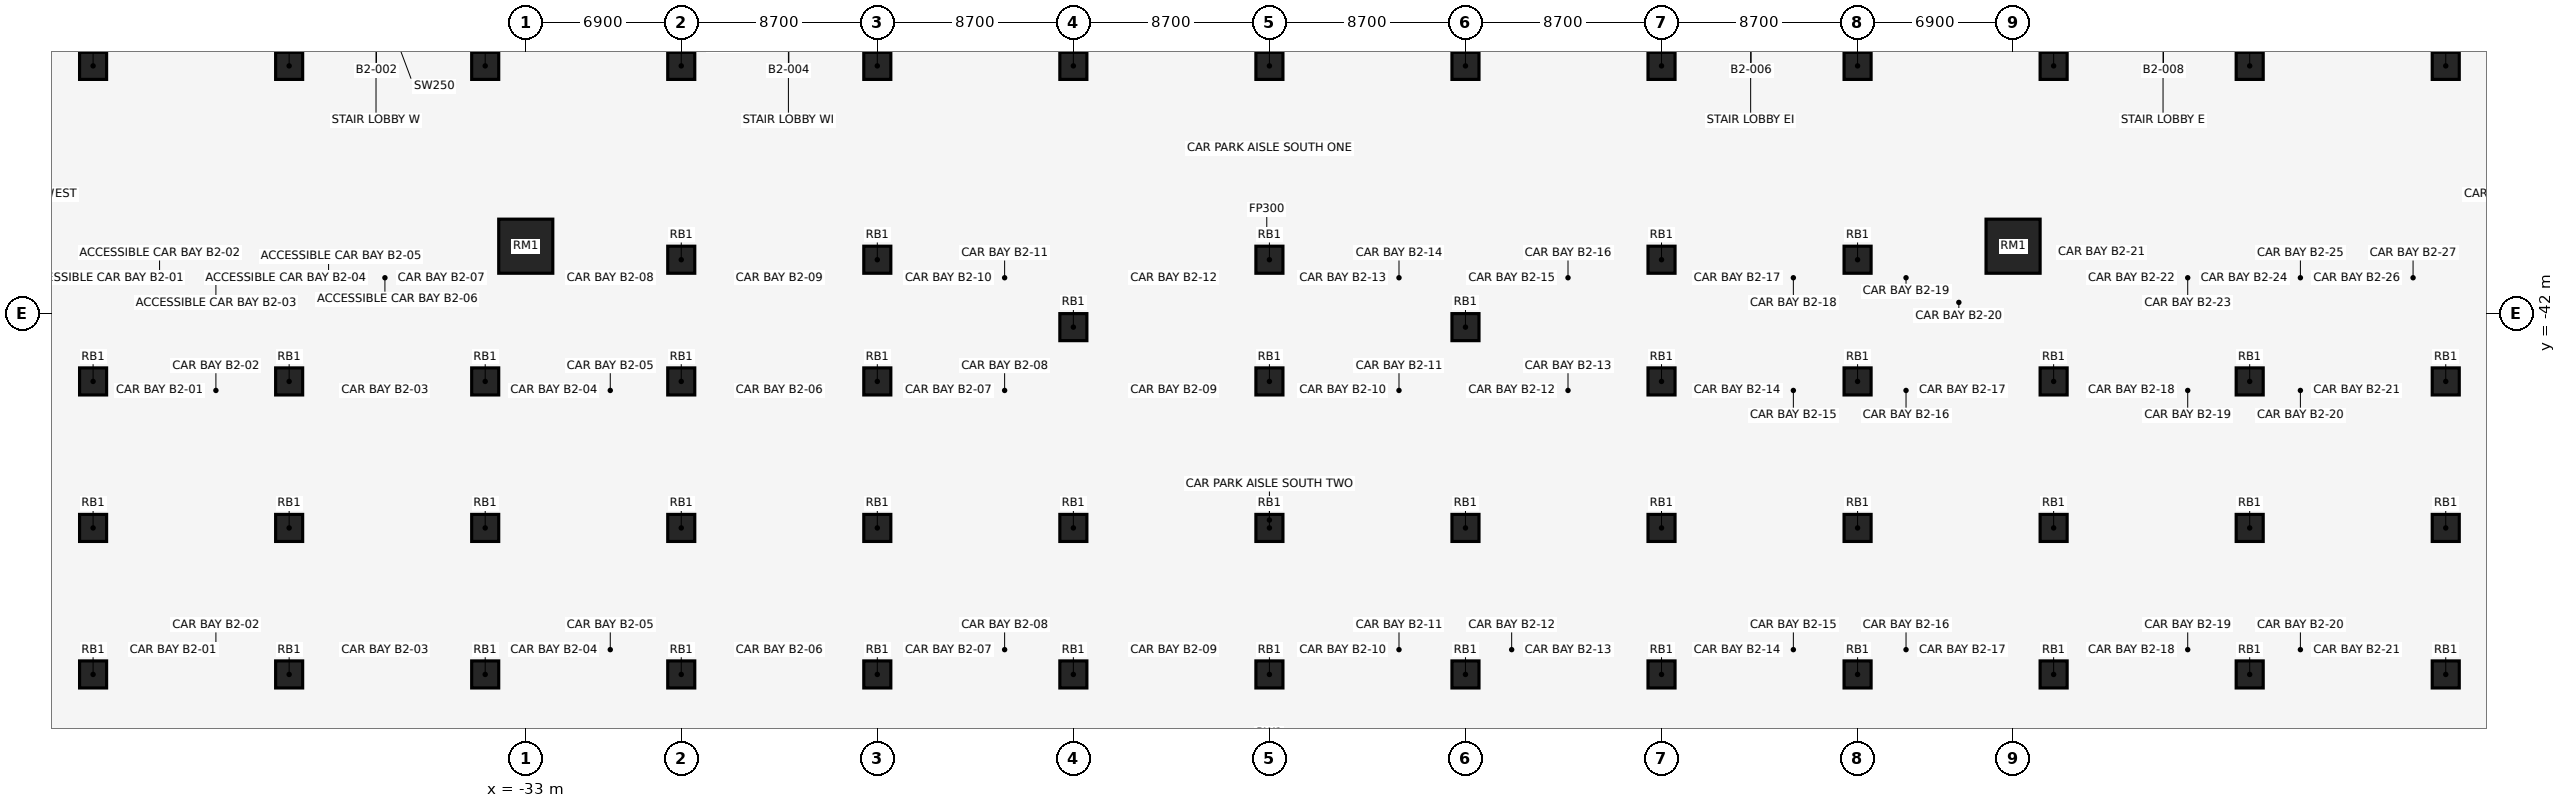
"""IFC4 building model, lengths in metres.
Left out: names, types, materials, properties, quantities, classifications, styles, units other than length and angle.
Written with IfcOpenShell. Run it as: python <this file> out.ifc"""

import sys

from ifc_helpers import new_model, si_unit, direction, frame, origin, origin_2d, place, context, subcontext, project, spatial, rectangle, extrude, element, save


model = new_model("IFC4")
c1 = context("Model", 3, precision=1e-05, world=origin(), true_north=direction((0.0, 1.0)))
c2 = subcontext(c1, "Body", "Model", "MODEL_VIEW")
j1 = project(units=[si_unit("LENGTHUNIT", "METRE"), si_unit("PLANEANGLEUNIT", "RADIAN")], contexts=[c1])
p1 = place(None, origin())
s1 = spatial("IfcSite", under=j1, at=p1, CompositionType="ELEMENT")
p2 = place(p1, origin())
s2 = spatial("IfcBuilding", under=s1, at=p2, CompositionType="ELEMENT")
p3 = place(p2, frame((0.0, 0.0, -10.0)))
s3 = spatial("IfcBuildingStorey", under=s2, at=p3, CompositionType="ELEMENT", Elevation=-10.0)
p4 = place(p3, frame((-33.0, -39.0, 0.0), z_axis=(0.0, 0.0, 1.0), x_axis=(1.0, 0.0, 0.0)))
e1 = element("IfcColumn", 1, at=p4, inside=s3, PredefinedType="COLUMN", context=c2, shape_type="SweptSolid", body=[
    extrude(rectangle(XDim=2.4, YDim=2.4, at=origin_2d()), origin(), (0.0, 0.0, 1.0), 5.0),
])
for number, where, z_axis, x_axis in (
    (2, (-26.1, -39.6, 0.0), (0.0, 0.0, 1.0), (1.0, 0.0, 0.0)),
    (3, (-17.4, -39.6, 0.0), (0.0, 0.0, 1.0), (1.0, 0.0, 0.0)),
    (4, (-8.7, -42.591, 0.0), (0.0, 0.0, 1.0), (1.0, 0.0, 0.0)),
    (5, (0.0, -39.6, 0.0), (0.0, 0.0, 1.0), (1.0, 0.0, 0.0)),
    (6, (8.7, -42.591, 0.0), (0.0, 0.0, 1.0), (1.0, 0.0, 0.0)),
    (7, (17.4, -39.6, 0.0), (0.0, 0.0, 1.0), (1.0, 0.0, 0.0)),
    (8, (26.1, -39.6, 0.0), (0.0, 0.0, 1.0), (1.0, 0.0, 0.0)),
):
    element("IfcColumn", number, at=place(p3, frame(where, z_axis=z_axis, x_axis=x_axis)), inside=s3, PredefinedType="COLUMN", context=c2, shape_type="SweptSolid", body=[
        extrude(rectangle(XDim=1.2, YDim=1.2, at=origin_2d()), origin(), (0.0, 0.0, 1.0), 5.0),
    ])
p5 = place(p3, frame((33.0, -39.0, 0.0), z_axis=(0.0, 0.0, 1.0), x_axis=(1.0, 0.0, 0.0)))
e9 = element("IfcColumn", 9, at=p5, inside=s3, PredefinedType="COLUMN", context=c2, shape_type="SweptSolid", body=[
    extrude(rectangle(XDim=2.4, YDim=2.4, at=origin_2d()), origin(), (0.0, 0.0, 1.0), 5.0),
])
for number, where, z_axis, x_axis in (
    (10, (-52.2, -31.0, 0.0), (0.0, 0.0, 1.0), (1.0, 0.0, 0.0)),
    (11, (-52.2, -45.0, 0.0), (0.0, 0.0, 1.0), (1.0, 0.0, 0.0)),
    (12, (-52.2, -51.5, 0.0), (0.0, 0.0, 1.0), (1.0, 0.0, 0.0)),
    (13, (-52.2, -58.0, 0.0), (0.0, 0.0, 1.0), (1.0, 0.0, 0.0)),
    (14, (-43.5, -31.0, 0.0), (0.0, 0.0, 1.0), (1.0, 0.0, 0.0)),
    (15, (-43.5, -45.0, 0.0), (0.0, 0.0, 1.0), (1.0, 0.0, 0.0)),
    (16, (-43.5, -51.5, 0.0), (0.0, 0.0, 1.0), (1.0, 0.0, 0.0)),
    (17, (-43.5, -58.0, 0.0), (0.0, 0.0, 1.0), (1.0, 0.0, 0.0)),
    (18, (-34.8, -31.0, 0.0), (0.0, 0.0, 1.0), (1.0, 0.0, 0.0)),
    (19, (-34.8, -45.0, 0.0), (0.0, 0.0, 1.0), (1.0, 0.0, 0.0)),
    (20, (-34.8, -51.5, 0.0), (0.0, 0.0, 1.0), (1.0, 0.0, 0.0)),
    (21, (-34.8, -58.0, 0.0), (0.0, 0.0, 1.0), (1.0, 0.0, 0.0)),
    (22, (-26.1, -31.0, 0.0), (0.0, 0.0, 1.0), (1.0, 0.0, 0.0)),
    (23, (-26.1, -45.0, 0.0), (0.0, 0.0, 1.0), (1.0, 0.0, 0.0)),
    (24, (-26.1, -51.5, 0.0), (0.0, 0.0, 1.0), (1.0, 0.0, 0.0)),
    (25, (-26.1, -58.0, 0.0), (0.0, 0.0, 1.0), (1.0, 0.0, 0.0)),
    (26, (-17.4, -31.0, 0.0), (0.0, 0.0, 1.0), (1.0, 0.0, 0.0)),
    (27, (-17.4, -45.0, 0.0), (0.0, 0.0, 1.0), (1.0, 0.0, 0.0)),
    (28, (-17.4, -51.5, 0.0), (0.0, 0.0, 1.0), (1.0, 0.0, 0.0)),
    (29, (-17.4, -58.0, 0.0), (0.0, 0.0, 1.0), (1.0, 0.0, 0.0)),
    (30, (-8.7, -31.0, 0.0), (0.0, 0.0, 1.0), (1.0, 0.0, 0.0)),
    (31, (-8.7, -51.5, 0.0), (0.0, 0.0, 1.0), (1.0, 0.0, 0.0)),
    (32, (-8.7, -58.0, 0.0), (0.0, 0.0, 1.0), (1.0, 0.0, 0.0)),
    (33, (0.0, -31.0, 0.0), (0.0, 0.0, 1.0), (1.0, 0.0, 0.0)),
    (34, (0.0, -45.0, 0.0), (0.0, 0.0, 1.0), (1.0, 0.0, 0.0)),
    (35, (0.0, -51.5, 0.0), (0.0, 0.0, 1.0), (1.0, 0.0, 0.0)),
    (36, (0.0, -58.0, 0.0), (0.0, 0.0, 1.0), (1.0, 0.0, 0.0)),
    (37, (8.7, -31.0, 0.0), (0.0, 0.0, 1.0), (1.0, 0.0, 0.0)),
    (38, (8.7, -51.5, 0.0), (0.0, 0.0, 1.0), (1.0, 0.0, 0.0)),
    (39, (8.7, -58.0, 0.0), (0.0, 0.0, 1.0), (1.0, 0.0, 0.0)),
    (40, (17.4, -31.0, 0.0), (0.0, 0.0, 1.0), (1.0, 0.0, 0.0)),
    (41, (17.4, -45.0, 0.0), (0.0, 0.0, 1.0), (1.0, 0.0, 0.0)),
    (42, (17.4, -51.5, 0.0), (0.0, 0.0, 1.0), (1.0, 0.0, 0.0)),
    (43, (17.4, -58.0, 0.0), (0.0, 0.0, 1.0), (1.0, 0.0, 0.0)),
    (44, (26.1, -31.0, 0.0), (0.0, 0.0, 1.0), (1.0, 0.0, 0.0)),
    (45, (26.1, -45.0, 0.0), (0.0, 0.0, 1.0), (1.0, 0.0, 0.0)),
    (46, (26.1, -51.5, 0.0), (0.0, 0.0, 1.0), (1.0, 0.0, 0.0)),
    (47, (26.1, -58.0, 0.0), (0.0, 0.0, 1.0), (1.0, 0.0, 0.0)),
    (48, (34.8, -31.0, 0.0), (0.0, 0.0, 1.0), (1.0, 0.0, 0.0)),
    (49, (34.8, -45.0, 0.0), (0.0, 0.0, 1.0), (1.0, 0.0, 0.0)),
    (50, (34.8, -51.5, 0.0), (0.0, 0.0, 1.0), (1.0, 0.0, 0.0)),
    (51, (34.8, -58.0, 0.0), (0.0, 0.0, 1.0), (1.0, 0.0, 0.0)),
    (52, (43.5, -31.0, 0.0), (0.0, 0.0, 1.0), (1.0, 0.0, 0.0)),
    (53, (43.5, -45.0, 0.0), (0.0, 0.0, 1.0), (1.0, 0.0, 0.0)),
    (54, (43.5, -51.5, 0.0), (0.0, 0.0, 1.0), (1.0, 0.0, 0.0)),
    (55, (43.5, -58.0, 0.0), (0.0, 0.0, 1.0), (1.0, 0.0, 0.0)),
    (56, (52.2, -31.0, 0.0), (0.0, 0.0, 1.0), (1.0, 0.0, 0.0)),
    (57, (52.2, -45.0, 0.0), (0.0, 0.0, 1.0), (1.0, 0.0, 0.0)),
    (58, (52.2, -51.5, 0.0), (0.0, 0.0, 1.0), (1.0, 0.0, 0.0)),
    (59, (52.2, -58.0, 0.0), (0.0, 0.0, 1.0), (1.0, 0.0, 0.0)),
):
    element("IfcColumn", number, at=place(p3, frame(where, z_axis=z_axis, x_axis=x_axis)), inside=s3, PredefinedType="COLUMN", context=c2, shape_type="SweptSolid", body=[
        extrude(rectangle(XDim=1.2, YDim=1.2, at=origin_2d()), origin(), (0.0, 0.0, 1.0), 5.0),
    ])
save(model, sys.argv[1])
